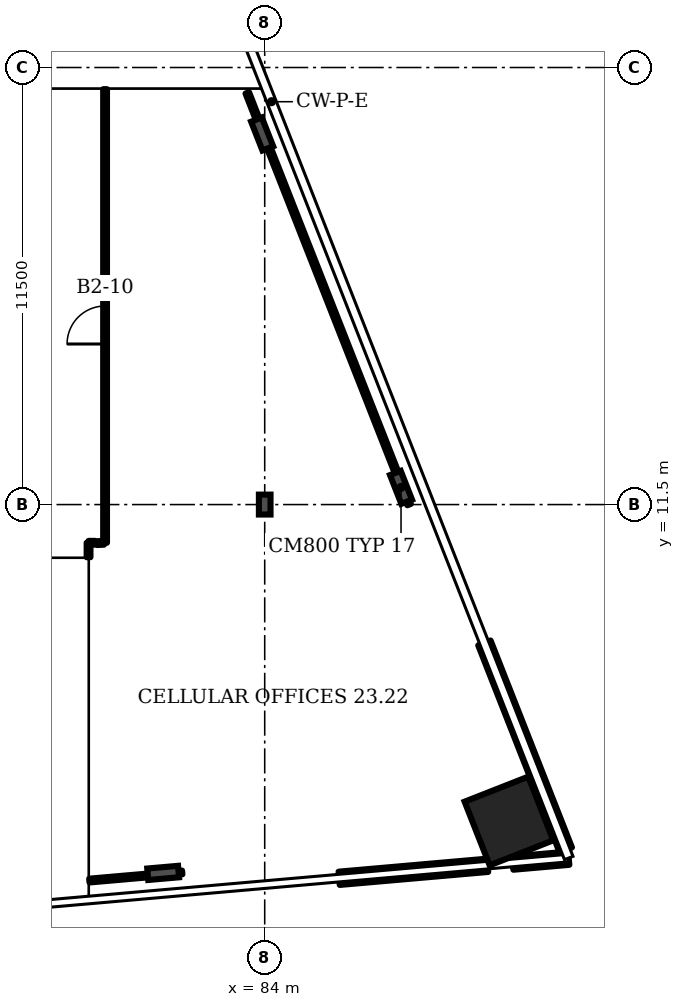
"""IFC4 building model, lengths in metres.
Left out: names, types, materials, properties, quantities, classifications, styles, units other than length and angle.
Written with IfcOpenShell. Run it as: python <this file> out.ifc"""

import sys

from ifc_helpers import new_model, si_unit, direction, frame, frame_2d, origin, origin_2d, place, context, subcontext, project, spatial, rectangle, i_section, extrude, element, fill, save


model = new_model("IFC4")
c1 = context("Model", 3, precision=1e-05, world=origin(), true_north=direction((0.0, 1.0)))
c2 = subcontext(c1, "Body", "Model", "MODEL_VIEW")
j1 = project(units=[si_unit("LENGTHUNIT", "METRE"), si_unit("PLANEANGLEUNIT", "RADIAN")], contexts=[c1])
p1 = place(None, origin())
s1 = spatial("IfcSite", under=j1, at=p1, CompositionType="ELEMENT")
p2 = place(p1, origin())
s2 = spatial("IfcBuilding", under=s1, at=p2, CompositionType="ELEMENT")
p3 = place(p2, frame((0.0, 0.0, 103.9)))
s3 = spatial("IfcBuildingStorey", under=s2, at=p3, CompositionType="ELEMENT", Elevation=103.9)
p4 = place(p3, frame((90.427, 3.174, 0.0), z_axis=(0.0, 0.0, 1.0), x_axis=(-0.365778, 0.930702, 0.0)))
e1 = element("IfcColumn", 1, at=p4, inside=s3, PredefinedType="COLUMN", context=c2, shape_type="SweptSolid", body=[
    extrude(rectangle(XDim=1.8, YDim=1.8, at=origin_2d()), origin(), (0.0, 0.0, 1.0), 3.6),
])
for number, where, z_axis, x_axis in (
    (2, (81.328, 1.808, 0.0), (0.0, 0.0, 1.0), (0.087, -0.996, 0.0)),
    (3, (87.587, 11.952, 0.0), (0.0, 0.0, 1.0), (0.931, 0.366, 0.0)),
    (4, (83.933, 21.251, 0.0), (0.0, 0.0, 1.0), (0.931, 0.366, 0.0)),
):
    element("IfcColumn", number, at=place(p3, frame(where, z_axis=z_axis, x_axis=x_axis)), inside=s3, PredefinedType="COLUMN", context=c2, shape_type="SweptSolid", body=[
        extrude(i_section(OverallWidth=0.303, OverallDepth=0.814, WebThickness=0.021, FlangeThickness=0.04, FilletRadius=0.03, at=origin_2d()), origin(), (0.0, 0.0, 1.0), 3.6),
    ])
p5 = place(p3, frame((84.0, 11.5, 0.0), z_axis=(0.0, 0.0, 1.0), x_axis=(1.0, 0.0, 0.0)))
e5 = element("IfcColumn", 5, at=p5, inside=s3, PredefinedType="COLUMN", context=c2, shape_type="SweptSolid", body=[
    extrude(i_section(OverallWidth=0.306, OverallDepth=0.524, WebThickness=0.021, FlangeThickness=0.04, FilletRadius=0.027, at=origin_2d()), origin(), (0.0, 0.0, 1.0), 3.6),
])
p6 = place(p3, frame((85.959, 1.667, 0.0), z_axis=(0.0, 0.0, 1.0), x_axis=(0.996194, 0.087167, 0.0)))
e6 = element("IfcWall", 6, at=p6, inside=s3, PredefinedType="SOLIDWALL", context=c2, shape_type="SweptSolid", body=[
    extrude(rectangle(XDim=3.921, YDim=0.35, at=frame_2d((1.96, 0.0))), origin(), (0.0, 0.0, 1.0), 1.0),
])
p7 = place(p3, frame((90.527, 2.066, 0.0), z_axis=(0.0, 0.0, 1.0), x_axis=(0.996198, 0.087157, 0.0)))
e7 = element("IfcWall", 7, at=p7, inside=s3, PredefinedType="SOLIDWALL", context=c2, shape_type="SweptSolid", body=[
    extrude(rectangle(XDim=1.479, YDim=0.35, at=frame_2d((0.74, 0.0))), origin(), (0.0, 0.0, 1.0), 1.0),
])
p8 = place(p3, frame((91.921, 2.414, 0.0), z_axis=(0.0, 0.0, 1.0), x_axis=(-0.36578, 0.930701, 0.0)))
e8 = element("IfcWall", 8, at=p8, inside=s3, PredefinedType="SOLIDWALL", context=c2, shape_type="SweptSolid", body=[
    extrude(rectangle(XDim=5.852, YDim=0.35, at=frame_2d((2.926, 0.0))), origin(), (0.0, 0.0, 1.0), 1.0),
])
p9 = place(p3, frame((79.365, 10.115, 0.0), z_axis=(0.0, 0.0, 1.0), x_axis=(0.0, 1.0, 0.0)))
e9 = element("IfcWall", 9, at=p9, inside=s3, PredefinedType="PARTITIONING", context=c2, shape_type="SweptSolid", body=[
    extrude(rectangle(XDim=0.38, YDim=0.1, at=frame_2d((0.19, 0.0))), origin(), (0.0, 0.0, 1.0), 3.2),
])
p10 = place(p3, frame((79.365, 10.495, 0.0), z_axis=(0.0, 0.0, 1.0), x_axis=(1.0, 0.0, 0.0)))
e10 = element("IfcWall", 10, at=p10, inside=s3, PredefinedType="PARTITIONING", context=c2, shape_type="SweptSolid", body=[
    extrude(rectangle(XDim=0.17, YDim=0.1, at=frame_2d((0.085, 0.0))), origin(), (0.0, 0.0, 1.0), 3.2),
])
p11 = place(p3, frame((79.386, 1.607, 0.0), z_axis=(0.0, 0.0, 1.0), x_axis=(0.996209, 0.086973, 0.0)))
e11 = element("IfcWall", 11, at=p11, inside=s3, PredefinedType="PARTITIONING", context=c2, shape_type="SweptSolid", body=[
    extrude(rectangle(XDim=2.453, YDim=0.1, at=frame_2d((1.227, 0.0))), origin(), (0.0, 0.0, 1.0), 2.58),
])
p12 = place(p3, frame((79.59, 10.485, 0.0), z_axis=(0.0, 0.0, 1.0), x_axis=(0.998455, 0.055545, 0.0)))
e12 = element("IfcWall", 12, at=p12, inside=s3, PredefinedType="PARTITIONING", context=c2, shape_type="SweptSolid", body=[
    extrude(rectangle(XDim=0.18, YDim=0.1, at=frame_2d((0.09, 0.0))), origin(), (0.0, 0.0, 1.0), 3.2),
])
p13 = place(p3, frame((79.8, 10.495, 0.0), z_axis=(0.0, 0.0, 1.0), x_axis=(0.0, 1.0, 0.0)))
e13 = element("IfcWall", 13, at=p13, inside=s3, PredefinedType="PARTITIONING", context=c2, shape_type="SweptSolid", body=[
    extrude(rectangle(XDim=11.935, YDim=0.1, at=frame_2d((5.967, 0.0))), origin(), (0.0, 0.0, 1.0), 3.2),
])
p14 = place(p13, frame((5.23, 0.0, 0.0)))
e14 = element("IfcOpeningElement", 14, at=p14, cuts=e13, PredefinedType="OPENING", context=c2, shape_type="SweptSolid", body=[
    extrude(rectangle(XDim=1.0, YDim=2.1, at=frame_2d((0.5, 1.05))), frame((0.0, 0.06, 0.0), z_axis=(0.0, -1.0, 0.0), x_axis=(1.0, 0.0, 0.0)), (0.0, 0.0, 1.0), 0.12),
])
p15 = place(p3, frame((83.96, 21.265, 0.0), z_axis=(0.0, 0.0, 1.0), x_axis=(-0.364889, 0.931052, 0.0)))
e15 = element("IfcWall", 15, at=p15, inside=s3, PredefinedType="PARTITIONING", context=c2, shape_type="SweptSolid", body=[
    extrude(rectangle(XDim=1.147, YDim=0.1, at=frame_2d((0.574, 0.0))), origin(), (0.0, 0.0, 1.0), 2.58),
])
p16 = place(p3, frame((87.8, 11.5, 0.0), z_axis=(0.0, 0.0, 1.0), x_axis=(-0.365945, 0.930635, 0.0)))
e16 = element("IfcWall", 16, at=p16, inside=s3, PredefinedType="PARTITIONING", context=c2, shape_type="SweptSolid", body=[
    extrude(rectangle(XDim=10.464, YDim=0.1, at=frame_2d((5.232, 0.0))), origin(), (0.0, 0.0, 1.0), 2.58),
])
p17 = place(p14, origin())
e17 = element("IfcDoor", 17, at=p17, inside=s3, OperationType="SINGLE_SWING_LEFT", PredefinedType="DOOR", context=c2, shape_type="SweptSolid", body=[
    extrude(rectangle(XDim=1.0, YDim=2.1, at=frame_2d((0.5, 1.05))), frame((0.0, 0.025, 0.0), z_axis=(0.0, -1.0, 0.0), x_axis=(1.0, 0.0, 0.0)), (0.0, 0.0, 1.0), 0.05),
])
fill(e14, e17)
save(model, sys.argv[1])
